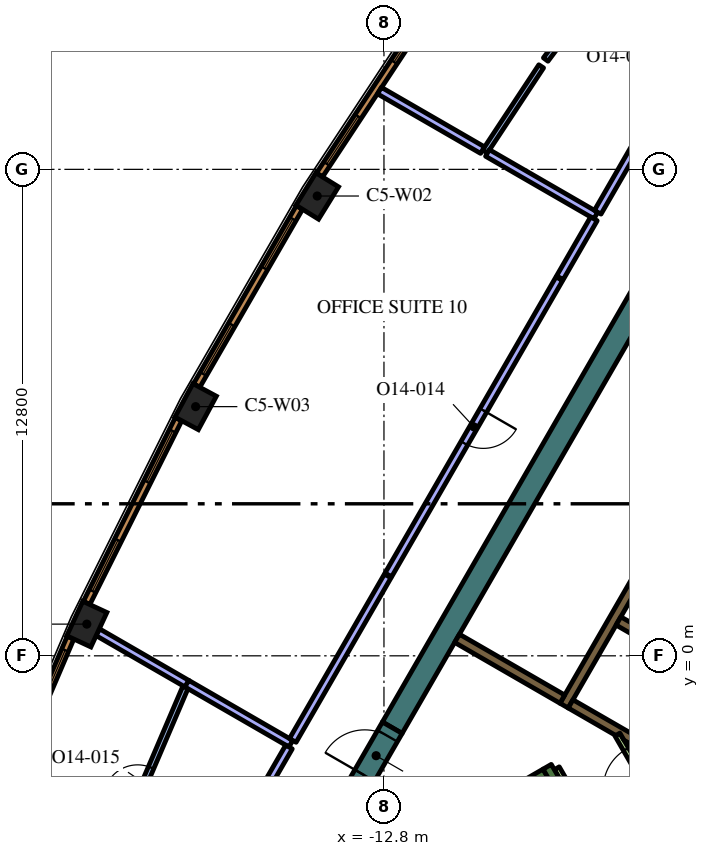
"""IFC4 building model, lengths in metres.
Left out: names, types, materials, properties, quantities, classifications, styles, units other than length and angle.
Written with IfcOpenShell. Run it as: python <this file> out.ifc"""

import sys

from ifc_helpers import new_model, si_unit, direction, frame, frame_2d, origin, origin_2d, place, context, subcontext, project, spatial, polyline, rectangle, outline, extrude, element, fill, save


model = new_model("IFC4")
c1 = context("Model", 3, precision=1e-05, world=origin(), true_north=direction((0.0, 1.0)))
c2 = subcontext(c1, "Body", "Model", "MODEL_VIEW")
j1 = project(units=[si_unit("LENGTHUNIT", "METRE"), si_unit("PLANEANGLEUNIT", "RADIAN")], contexts=[c1])
p1 = place(None, origin())
s1 = spatial("IfcSite", under=j1, at=p1, CompositionType="ELEMENT")
p2 = place(p1, origin())
s2 = spatial("IfcBuilding", under=s1, at=p2, CompositionType="ELEMENT")
p3 = place(p2, frame((0.0, 0.0, 313.2)))
s3 = spatial("IfcBuildingStorey", under=s2, at=p3, CompositionType="ELEMENT", Elevation=313.2)
for number, where, z_axis, x_axis in (
    (1, (-14.556, 12.098, 0.0), (0.0, 0.0, 1.0), (-0.526, -0.851, 0.0)),
    (2, (-17.756, 6.557, 0.0), (0.0, 0.0, 1.0), (-0.474, -0.881, 0.0)),
    (3, (-20.619, 0.834, 0.0), (0.0, 0.0, 1.0), (-0.421, -0.907, 0.0)),
):
    element("IfcColumn", number, at=place(p3, frame(where, z_axis=z_axis, x_axis=x_axis)), inside=s3, PredefinedType="COLUMN", context=c2, shape_type="SweptSolid", body=[
        extrude(rectangle(XDim=1.0, YDim=0.7, at=origin_2d()), origin(), (0.0, 0.0, 1.0), 4.2),
    ])
p4 = place(p3, frame((-12.582, -1.892, 0.0), z_axis=(0.0, 0.0, 1.0), x_axis=(0.500003640647, 0.866023301845, 0.0)))
e4 = element("IfcWall", 4, at=p4, inside=s3, PredefinedType="SOLIDWALL", context=c2, shape_type="SweptSolid", body=[
    extrude(rectangle(XDim=15.858, YDim=0.6, at=frame_2d((7.929, 0.0))), origin(), (0.0, 0.0, 1.0), 4.2),
])
p5 = place(p3, frame((-14.44, -6.49, 0.0), z_axis=(0.0, 0.0, 1.0), x_axis=(0.866022966069, 0.500004222222, 0.0)))
e5 = element("IfcWall", 5, at=p5, inside=s3, PredefinedType="SOLIDWALL", context=c2, shape_type="SweptSolid", body=[
    extrude(rectangle(XDim=6.8, YDim=0.25, at=frame_2d((3.4, 0.0))), origin(), (0.0, 0.0, 1.0), 4.2),
])
p6 = place(p3, frame((-8.168, -3.503, 0.0), z_axis=(0.0, 0.0, 1.0), x_axis=(-0.499952099219, 0.866053057547, 0.0)))
e6 = element("IfcWall", 6, at=p6, inside=s3, PredefinedType="SOLIDWALL", context=c2, shape_type="SweptSolid", body=[
    extrude(rectangle(XDim=0.675, YDim=0.25, at=frame_2d((0.337, 0.0))), origin(), (0.0, 0.0, 1.0), 4.2),
])
p7 = place(p3, frame((-8.06, -1.311, 0.0), z_axis=(0.0, 0.0, 1.0), x_axis=(0.50000273126, 0.866023826885, 0.0)))
e7 = element("IfcWall", 7, at=p7, inside=s3, PredefinedType="SOLIDWALL", context=c2, shape_type="SweptSolid", body=[
    extrude(rectangle(XDim=10.33, YDim=0.25, at=frame_2d((5.165, 0.0))), origin(), (0.0, 0.0, 1.0), 4.2),
])
p8 = place(p3, frame((-4.724, -0.182, 0.0), z_axis=(0.0, 0.0, 1.0), x_axis=(-0.866008176907, 0.50002983664, 0.0)))
e8 = element("IfcWall", 8, at=p8, inside=s3, PredefinedType="SOLIDWALL", context=c2, shape_type="SweptSolid", body=[
    extrude(rectangle(XDim=2.2, YDim=0.25, at=frame_2d((1.1, 0.0))), origin(), (0.0, 0.0, 1.0), 4.2),
])
p9 = place(p3, origin())
e9 = element("IfcWall", 9, at=p9, inside=s3, PredefinedType="SOLIDWALL", context=c2, shape_type="SweptSolid", body=[
    extrude(outline(polyline([(-5.922, -2.257), (-5.922, -2.257), (-5.705, -2.382), (-5.83, -2.598), (-6.483, -2.221), (-6.591, -2.033), (-6.591, -2.033), (-6.7, -2.096), (-7.952, -1.373), (-7.827, -1.156), (-5.922, -2.257)])), origin(), (0.0, 0.0, 1.0), 4.2),
])
p10 = place(p3, frame((-8.106, -1.14, 0.0), z_axis=(0.0, 0.0, 1.0), x_axis=(-0.866008981251, 0.500028443584, 0.0)))
e10 = element("IfcWall", 10, at=p10, inside=s3, PredefinedType="SOLIDWALL", context=c2, shape_type="SweptSolid", body=[
    extrude(rectangle(XDim=3.2, YDim=0.25, at=frame_2d((1.6, 0.0))), origin(), (0.0, 0.0, 1.0), 4.2),
])
p11 = place(p3, frame((-8.252, -2.958, 0.0), z_axis=(0.0, 0.0, 1.0), x_axis=(0.500174715838, -0.865924508047, 0.0)))
e11 = element("IfcWall", 11, at=p11, inside=s3, PredefinedType="PARTITIONING", context=c2, shape_type="SweptSolid", body=[
    extrude(rectangle(XDim=0.514, YDim=0.15, at=frame_2d((0.257, 0.0))), origin(), (0.0, 0.0, 1.0), 3.55),
])
p12 = place(p3, frame((-5.606, -3.89, 0.0), z_axis=(0.0, 0.0, 1.0), x_axis=(-0.500027713859, 0.866009402589, 0.0)))
e12 = element("IfcWall", 12, at=p12, inside=s3, PredefinedType="PARTITIONING", context=c2, shape_type="SweptSolid", body=[
    extrude(rectangle(XDim=2.1, YDim=0.15, at=frame_2d((1.05, 0.0))), origin(), (0.0, 0.0, 1.0), 3.55),
])
p13 = place(p12, frame((0.45, 0.0, 0.0)))
e13 = element("IfcOpeningElement", 13, at=p13, cuts=e12, PredefinedType="OPENING", context=c2, shape_type="SweptSolid", body=[
    extrude(rectangle(XDim=1.2, YDim=2.1, at=frame_2d((0.6, 1.05))), frame((0.0, 0.085, 0.0), z_axis=(0.0, -1.0, 0.0), x_axis=(1.0, 0.0, 0.0)), (0.0, 0.0, 1.0), 0.17),
])
p14 = place(p3, frame((-13.432, -3.364, 0.0), z_axis=(0.0, 0.0, 1.0), x_axis=(0.500062241894, 0.865989465428, 0.0)))
e14 = element("IfcWall", 14, at=p14, inside=s3, PredefinedType="SOLIDWALL", context=c2, shape_type="SweptSolid", body=[
    extrude(rectangle(XDim=1.7, YDim=0.6, at=frame_2d((0.85, 0.0))), origin(), (0.0, 0.0, 1.0), 4.2),
])
p15 = place(p14, frame((0.25, 0.0, 0.0)))
e15 = element("IfcOpeningElement", 15, at=p15, cuts=e14, PredefinedType="OPENING", context=c2, shape_type="SweptSolid", body=[
    extrude(rectangle(XDim=1.2, YDim=2.1, at=frame_2d((0.6, 1.05))), frame((0.0, 0.31, 0.0), z_axis=(0.0, -1.0, 0.0), x_axis=(1.0, 0.0, 0.0)), (0.0, 0.0, 1.0), 0.62),
])
p16 = place(p3, frame((-8.544, 15.69, 0.0), z_axis=(0.0, 0.0, 1.0), x_axis=(0.599538824769, 0.800345673815, 0.0)))
e16 = element("IfcWall", 16, at=p16, inside=s3, PredefinedType="PARTITIONING", context=c2, shape_type="SweptSolid", body=[
    extrude(rectangle(XDim=3.474, YDim=0.15, at=frame_2d((1.737, 0.0))), origin(), (0.0, 0.0, 1.0), 3.55),
])
p17 = place(p16, frame((1.274, 0.0, 0.0)))
e17 = element("IfcOpeningElement", 17, at=p17, cuts=e16, PredefinedType="OPENING", context=c2, shape_type="SweptSolid", body=[
    extrude(rectangle(XDim=0.9, YDim=2.1, at=frame_2d((0.45, 1.05))), frame((0.0, 0.085, 0.0), z_axis=(0.0, -1.0, 0.0), x_axis=(1.0, 0.0, 0.0)), (0.0, 0.0, 1.0), 0.17),
])
p18 = place(p3, frame((-8.662, 15.511, 0.0), z_axis=(0.0, 0.0, 1.0), x_axis=(-0.550792824442, -0.834641997831, 0.0)))
e18 = element("IfcWall", 18, at=p18, inside=s3, PredefinedType="PARTITIONING", context=c2, shape_type="SweptSolid", body=[
    extrude(rectangle(XDim=2.686, YDim=0.15, at=frame_2d((1.343, 0.0))), origin(), (0.0, 0.0, 1.0), 3.55),
])
p19 = place(p3, frame((-10.207, 13.306, 0.0), z_axis=(0.0, 0.0, 1.0), x_axis=(-0.866041434906, 0.499972232254, 0.0)))
e19 = element("IfcWall", 19, at=p19, inside=s3, PredefinedType="PARTITIONING", context=c2, shape_type="SweptSolid", body=[
    extrude(rectangle(XDim=3.131, YDim=0.2, at=frame_2d((1.565, 0.0))), origin(), (0.0, 0.0, 1.0), 3.55),
])
p20 = place(p3, frame((-7.226, 11.585, 0.0), z_axis=(0.0, 0.0, 1.0), x_axis=(-0.866034923029, 0.499983511822, 0.0)))
e20 = element("IfcWall", 20, at=p20, inside=s3, PredefinedType="PARTITIONING", context=c2, shape_type="SweptSolid", body=[
    extrude(rectangle(XDim=3.292, YDim=0.2, at=frame_2d((1.646, 0.0))), origin(), (0.0, 0.0, 1.0), 3.55),
])
p21 = place(p3, frame((-3.306, 18.374, 0.0), z_axis=(0.0, 0.0, 1.0), x_axis=(-0.500000072396, -0.866025361987, 0.0)))
e21 = element("IfcWall", 21, at=p21, inside=s3, PredefinedType="PARTITIONING", context=c2, shape_type="SweptSolid", body=[
    extrude(rectangle(XDim=7.739, YDim=0.2, at=frame_2d((3.87, 0.0))), origin(), (0.0, 0.0, 1.0), 3.55),
])
p22 = place(p21, frame((3.4, 0.0, 0.0)))
e22 = element("IfcOpeningElement", 22, at=p22, cuts=e21, PredefinedType="OPENING", context=c2, shape_type="SweptSolid", body=[
    extrude(rectangle(XDim=1.0, YDim=2.1, at=frame_2d((0.5, 1.05))), frame((0.0, 0.11, 0.0), z_axis=(0.0, -1.0, 0.0), x_axis=(1.0, 0.0, 0.0)), (0.0, 0.0, 1.0), 0.22),
])
p23 = place(p3, frame((-17.98, -0.736, 0.0), z_axis=(0.0, 0.0, 1.0), x_axis=(-0.866049350164, 0.49995852136, 0.0)))
e23 = element("IfcWall", 23, at=p23, inside=s3, PredefinedType="PARTITIONING", context=c2, shape_type="SweptSolid", body=[
    extrude(rectangle(XDim=2.716, YDim=0.2, at=frame_2d((1.358, 0.0))), origin(), (0.0, 0.0, 1.0), 3.55),
])
p24 = place(p3, frame((-15.249, -2.312, 0.0), z_axis=(0.0, 0.0, 1.0), x_axis=(-0.866053113424, 0.499952002425, 0.0)))
e24 = element("IfcWall", 24, at=p24, inside=s3, PredefinedType="PARTITIONING", context=c2, shape_type="SweptSolid", body=[
    extrude(rectangle(XDim=3.161, YDim=0.2, at=frame_2d((1.581, 0.0))), origin(), (0.0, 0.0, 1.0), 3.55),
])
p25 = place(p3, frame((-8.186, 9.922, 0.0), z_axis=(0.0, 0.0, 1.0), x_axis=(-0.5000018851, -0.866024315419, 0.0)))
e25 = element("IfcWall", 25, at=p25, inside=s3, PredefinedType="PARTITIONING", context=c2, shape_type="SweptSolid", body=[
    extrude(rectangle(XDim=9.0, YDim=0.2, at=frame_2d((4.5, 0.0))), origin(), (0.0, 0.0, 1.0), 3.55),
])
p26 = place(p25, frame((4.0, 0.0, 0.0)))
e26 = element("IfcOpeningElement", 26, at=p26, cuts=e25, PredefinedType="OPENING", context=c2, shape_type="SweptSolid", body=[
    extrude(rectangle(XDim=1.0, YDim=2.1, at=frame_2d((0.5, 1.05))), frame((0.0, 0.11, 0.0), z_axis=(0.0, -1.0, 0.0), x_axis=(1.0, 0.0, 0.0)), (0.0, 0.0, 1.0), 0.22),
])
p27 = place(p3, frame((-12.701, 2.102, 0.0), z_axis=(0.0, 0.0, 1.0), x_axis=(-0.499974782844, -0.866039962427, 0.0)))
e27 = element("IfcWall", 27, at=p27, inside=s3, PredefinedType="PARTITIONING", context=c2, shape_type="SweptSolid", body=[
    extrude(rectangle(XDim=4.997, YDim=0.2, at=frame_2d((2.499, 0.0))), origin(), (0.0, 0.0, 1.0), 3.55),
])
p28 = place(p3, frame((-7.275, 11.499, 0.0), z_axis=(0.0, 0.0, 1.0), x_axis=(-0.500025407441, -0.866010734295, 0.0)))
e28 = element("IfcWall", 28, at=p28, inside=s3, PredefinedType="PARTITIONING", context=c2, shape_type="SweptSolid", body=[
    extrude(rectangle(XDim=1.791, YDim=0.2, at=frame_2d((0.895, 0.0))), origin(), (0.0, 0.0, 1.0), 3.55),
])
p29 = place(p3, frame((-20.188, -5.888, 0.0), z_axis=(0.0, 0.0, 1.0), x_axis=(0.393346486154, 0.919390309841, 0.0)))
e29 = element("IfcWall", 29, at=p29, inside=s3, PredefinedType="PARTITIONING", context=c2, shape_type="SweptSolid", body=[
    extrude(rectangle(XDim=5.505, YDim=0.15, at=frame_2d((2.752, 0.0))), origin(), (0.0, 0.0, 1.0), 3.55),
])
p30 = place(p29, frame((2.305, 0.0, 0.0)))
e30 = element("IfcOpeningElement", 30, at=p30, cuts=e29, PredefinedType="OPENING", context=c2, shape_type="SweptSolid", body=[
    extrude(rectangle(XDim=0.9, YDim=2.1, at=frame_2d((0.45, 1.05))), frame((0.0, 0.085, 0.0), z_axis=(0.0, -1.0, 0.0), x_axis=(1.0, 0.0, 0.0)), (0.0, 0.0, 1.0), 0.17),
])
p31 = place(p3, frame((-15.299, -2.399, 0.0), z_axis=(0.0, 0.0, 1.0), x_axis=(-0.49998958839, -0.866031414847, 0.0)))
e31 = element("IfcWall", 31, at=p31, inside=s3, PredefinedType="PARTITIONING", context=c2, shape_type="SweptSolid", body=[
    extrude(rectangle(XDim=4.562, YDim=0.2, at=frame_2d((2.281, 0.0))), origin(), (0.0, 0.0, 1.0), 3.55),
])
p32 = place(p31, frame((1.8, 0.0, 0.0)))
e32 = element("IfcOpeningElement", 32, at=p32, cuts=e31, PredefinedType="OPENING", context=c2, shape_type="SweptSolid", body=[
    extrude(rectangle(XDim=1.0, YDim=2.1, at=frame_2d((0.5, 1.05))), frame((0.0, 0.11, 0.0), z_axis=(0.0, -1.0, 0.0), x_axis=(1.0, 0.0, 0.0)), (0.0, 0.0, 1.0), 0.22),
])
p33 = place(p3, frame((-11.518, 17.166, 0.0), z_axis=(0.0, 0.0, 1.0), x_axis=(-0.550744054781, -0.83467417962, 0.0)))
e33 = element("IfcWall", 33, at=p33, inside=s3, PredefinedType="SOLIDWALL", context=c2, shape_type="SweptSolid", body=[
    extrude(rectangle(XDim=5.406, YDim=0.19, at=frame_2d((2.703, 0.0))), origin(), (0.0, 0.0, 1.0), 3.95),
])
p34 = place(p33, frame((0.346, 0.0, 0.6)))
e34 = element("IfcOpeningElement", 34, at=p34, cuts=e33, PredefinedType="OPENING", context=c2, shape_type="SweptSolid", body=[
    extrude(rectangle(XDim=1.5, YDim=2.85, at=frame_2d((0.75, 1.425))), frame((0.0, 0.105, 0.0), z_axis=(0.0, -1.0, 0.0), x_axis=(1.0, 0.0, 0.0)), (0.0, 0.0, 1.0), 0.21),
])
p35 = place(p33, frame((3.559, 0.0, 0.6)))
e35 = element("IfcOpeningElement", 35, at=p35, cuts=e33, PredefinedType="OPENING", context=c2, shape_type="SweptSolid", body=[
    extrude(rectangle(XDim=1.5, YDim=2.85, at=frame_2d((0.75, 1.425))), frame((0.0, 0.105, 0.0), z_axis=(0.0, -1.0, 0.0), x_axis=(1.0, 0.0, 0.0)), (0.0, 0.0, 1.0), 0.21),
])
p36 = place(p3, frame((-15.025, 11.796, 0.0), z_axis=(0.0, 0.0, 1.0), x_axis=(-0.500024767483, -0.866011103799, 0.0)))
e36 = element("IfcWall", 36, at=p36, inside=s3, PredefinedType="SOLIDWALL", context=c2, shape_type="SweptSolid", body=[
    extrude(rectangle(XDim=5.406, YDim=0.19, at=frame_2d((2.703, 0.0))), origin(), (0.0, 0.0, 1.0), 3.95),
])
p37 = place(p36, frame((0.346, 0.0, 0.6)))
e37 = element("IfcOpeningElement", 37, at=p37, cuts=e36, PredefinedType="OPENING", context=c2, shape_type="SweptSolid", body=[
    extrude(rectangle(XDim=1.5, YDim=2.85, at=frame_2d((0.75, 1.425))), frame((0.0, 0.105, 0.0), z_axis=(0.0, -1.0, 0.0), x_axis=(1.0, 0.0, 0.0)), (0.0, 0.0, 1.0), 0.21),
])
p38 = place(p36, frame((3.559, 0.0, 0.6)))
e38 = element("IfcOpeningElement", 38, at=p38, cuts=e36, PredefinedType="OPENING", context=c2, shape_type="SweptSolid", body=[
    extrude(rectangle(XDim=1.5, YDim=2.85, at=frame_2d((0.75, 1.425))), frame((0.0, 0.105, 0.0), z_axis=(0.0, -1.0, 0.0), x_axis=(1.0, 0.0, 0.0)), (0.0, 0.0, 1.0), 0.21),
])
p39 = place(p3, frame((-18.206, 6.227, 0.0), z_axis=(0.0, 0.0, 1.0), x_axis=(-0.447484531401, -0.894291671747, 0.0)))
e39 = element("IfcWall", 39, at=p39, inside=s3, PredefinedType="SOLIDWALL", context=c2, shape_type="SweptSolid", body=[
    extrude(rectangle(XDim=5.406, YDim=0.19, at=frame_2d((2.703, 0.0))), origin(), (0.0, 0.0, 1.0), 3.95),
])
p40 = place(p39, frame((0.346, 0.0, 0.6)))
e40 = element("IfcOpeningElement", 40, at=p40, cuts=e39, PredefinedType="OPENING", context=c2, shape_type="SweptSolid", body=[
    extrude(rectangle(XDim=1.5, YDim=2.85, at=frame_2d((0.75, 1.425))), frame((0.0, 0.105, 0.0), z_axis=(0.0, -1.0, 0.0), x_axis=(1.0, 0.0, 0.0)), (0.0, 0.0, 1.0), 0.21),
])
p41 = place(p39, frame((3.559, 0.0, 0.6)))
e41 = element("IfcOpeningElement", 41, at=p41, cuts=e39, PredefinedType="OPENING", context=c2, shape_type="SweptSolid", body=[
    extrude(rectangle(XDim=1.5, YDim=2.85, at=frame_2d((0.75, 1.425))), frame((0.0, 0.105, 0.0), z_axis=(0.0, -1.0, 0.0), x_axis=(1.0, 0.0, 0.0)), (0.0, 0.0, 1.0), 0.21),
])
p42 = place(p3, frame((-21.049, 0.478, 0.0), z_axis=(0.0, 0.0, 1.0), x_axis=(-0.393347848476, -0.919389726992, 0.0)))
e42 = element("IfcWall", 42, at=p42, inside=s3, PredefinedType="SOLIDWALL", context=c2, shape_type="SweptSolid", body=[
    extrude(rectangle(XDim=5.415, YDim=0.19, at=frame_2d((2.708, 0.0))), origin(), (0.0, 0.0, 1.0), 3.95),
])
p43 = place(p42, frame((0.357, 0.0, 0.6)))
e43 = element("IfcOpeningElement", 43, at=p43, cuts=e42, PredefinedType="OPENING", context=c2, shape_type="SweptSolid", body=[
    extrude(rectangle(XDim=1.5, YDim=2.85, at=frame_2d((0.75, 1.425))), frame((0.0, 0.105, 0.0), z_axis=(0.0, -1.0, 0.0), x_axis=(1.0, 0.0, 0.0)), (0.0, 0.0, 1.0), 0.21),
])
p44 = place(p42, frame((3.593, 0.0, 0.6)))
e44 = element("IfcOpeningElement", 44, at=p44, cuts=e42, PredefinedType="OPENING", context=c2, shape_type="SweptSolid", body=[
    extrude(rectangle(XDim=1.5, YDim=2.85, at=frame_2d((0.75, 1.425))), frame((0.0, 0.105, 0.0), z_axis=(0.0, -1.0, 0.0), x_axis=(1.0, 0.0, 0.0)), (0.0, 0.0, 1.0), 0.21),
])
p45 = place(p13, origin())
e45 = element("IfcDoor", 45, at=p45, inside=s3, OperationType="SINGLE_SWING_LEFT", PredefinedType="DOOR", context=c2, shape_type="SweptSolid", body=[
    extrude(rectangle(XDim=1.2, YDim=2.1, at=frame_2d((0.6, 1.05))), frame((0.0, 0.025, 0.0), z_axis=(0.0, -1.0, 0.0), x_axis=(1.0, 0.0, 0.0)), (0.0, 0.0, 1.0), 0.05),
])
fill(e13, e45)
p46 = place(p15, origin())
e46 = element("IfcDoor", 46, at=p46, inside=s3, OperationType="SINGLE_SWING_LEFT", PredefinedType="DOOR", context=c2, shape_type="SweptSolid", body=[
    extrude(rectangle(XDim=1.2, YDim=2.1, at=frame_2d((0.6, 1.05))), frame((0.0, 0.025, 0.0), z_axis=(0.0, -1.0, 0.0), x_axis=(1.0, 0.0, 0.0)), (0.0, 0.0, 1.0), 0.05),
])
fill(e15, e46)
p47 = place(p26, origin())
e47 = element("IfcDoor", 47, at=p47, inside=s3, OperationType="SINGLE_SWING_LEFT", PredefinedType="DOOR", context=c2, shape_type="SweptSolid", body=[
    extrude(rectangle(XDim=1.0, YDim=2.1, at=frame_2d((0.5, 1.05))), frame((0.0, 0.025, 0.0), z_axis=(0.0, -1.0, 0.0), x_axis=(1.0, 0.0, 0.0)), (0.0, 0.0, 1.0), 0.05),
])
fill(e26, e47)
p48 = place(p30, origin())
e48 = element("IfcDoor", 48, at=p48, inside=s3, OperationType="SINGLE_SWING_RIGHT", PredefinedType="DOOR", context=c2, shape_type="SweptSolid", body=[
    extrude(rectangle(XDim=0.9, YDim=2.1, at=frame_2d((0.45, 1.05))), frame((0.0, 0.025, 0.0), z_axis=(0.0, -1.0, 0.0), x_axis=(1.0, 0.0, 0.0)), (0.0, 0.0, 1.0), 0.05),
])
fill(e30, e48)
p49 = place(p34, origin())
e49 = element("IfcWindow", 49, at=p49, inside=s3, PartitioningType="SINGLE_PANEL", PredefinedType="WINDOW", context=c2, shape_type="SweptSolid", body=[
    extrude(rectangle(XDim=1.5, YDim=2.85, at=frame_2d((0.75, 1.425))), frame((0.0, 0.045, 0.0), z_axis=(0.0, -1.0, 0.0), x_axis=(1.0, 0.0, 0.0)), (0.0, 0.0, 1.0), 0.06),
])
fill(e34, e49)
p50 = place(p35, origin())
e50 = element("IfcWindow", 50, at=p50, inside=s3, PartitioningType="SINGLE_PANEL", PredefinedType="WINDOW", context=c2, shape_type="SweptSolid", body=[
    extrude(rectangle(XDim=1.5, YDim=2.85, at=frame_2d((0.75, 1.425))), frame((0.0, 0.045, 0.0), z_axis=(0.0, -1.0, 0.0), x_axis=(1.0, 0.0, 0.0)), (0.0, 0.0, 1.0), 0.06),
])
fill(e35, e50)
p51 = place(p37, origin())
e51 = element("IfcWindow", 51, at=p51, inside=s3, PartitioningType="SINGLE_PANEL", PredefinedType="WINDOW", context=c2, shape_type="SweptSolid", body=[
    extrude(rectangle(XDim=1.5, YDim=2.85, at=frame_2d((0.75, 1.425))), frame((0.0, 0.045, 0.0), z_axis=(0.0, -1.0, 0.0), x_axis=(1.0, 0.0, 0.0)), (0.0, 0.0, 1.0), 0.06),
])
fill(e37, e51)
p52 = place(p38, origin())
e52 = element("IfcWindow", 52, at=p52, inside=s3, PartitioningType="SINGLE_PANEL", PredefinedType="WINDOW", context=c2, shape_type="SweptSolid", body=[
    extrude(rectangle(XDim=1.5, YDim=2.85, at=frame_2d((0.75, 1.425))), frame((0.0, 0.045, 0.0), z_axis=(0.0, -1.0, 0.0), x_axis=(1.0, 0.0, 0.0)), (0.0, 0.0, 1.0), 0.06),
])
fill(e38, e52)
p53 = place(p40, origin())
e53 = element("IfcWindow", 53, at=p53, inside=s3, PartitioningType="SINGLE_PANEL", PredefinedType="WINDOW", context=c2, shape_type="SweptSolid", body=[
    extrude(rectangle(XDim=1.5, YDim=2.85, at=frame_2d((0.75, 1.425))), frame((0.0, 0.045, 0.0), z_axis=(0.0, -1.0, 0.0), x_axis=(1.0, 0.0, 0.0)), (0.0, 0.0, 1.0), 0.06),
])
fill(e40, e53)
p54 = place(p41, origin())
e54 = element("IfcWindow", 54, at=p54, inside=s3, PartitioningType="SINGLE_PANEL", PredefinedType="WINDOW", context=c2, shape_type="SweptSolid", body=[
    extrude(rectangle(XDim=1.5, YDim=2.85, at=frame_2d((0.75, 1.425))), frame((0.0, 0.045, 0.0), z_axis=(0.0, -1.0, 0.0), x_axis=(1.0, 0.0, 0.0)), (0.0, 0.0, 1.0), 0.06),
])
fill(e41, e54)
p55 = place(p43, origin())
e55 = element("IfcWindow", 55, at=p55, inside=s3, PartitioningType="SINGLE_PANEL", PredefinedType="WINDOW", context=c2, shape_type="SweptSolid", body=[
    extrude(rectangle(XDim=1.5, YDim=2.85, at=frame_2d((0.75, 1.425))), frame((0.0, 0.045, 0.0), z_axis=(0.0, -1.0, 0.0), x_axis=(1.0, 0.0, 0.0)), (0.0, 0.0, 1.0), 0.06),
])
fill(e43, e55)
save(model, sys.argv[1])
